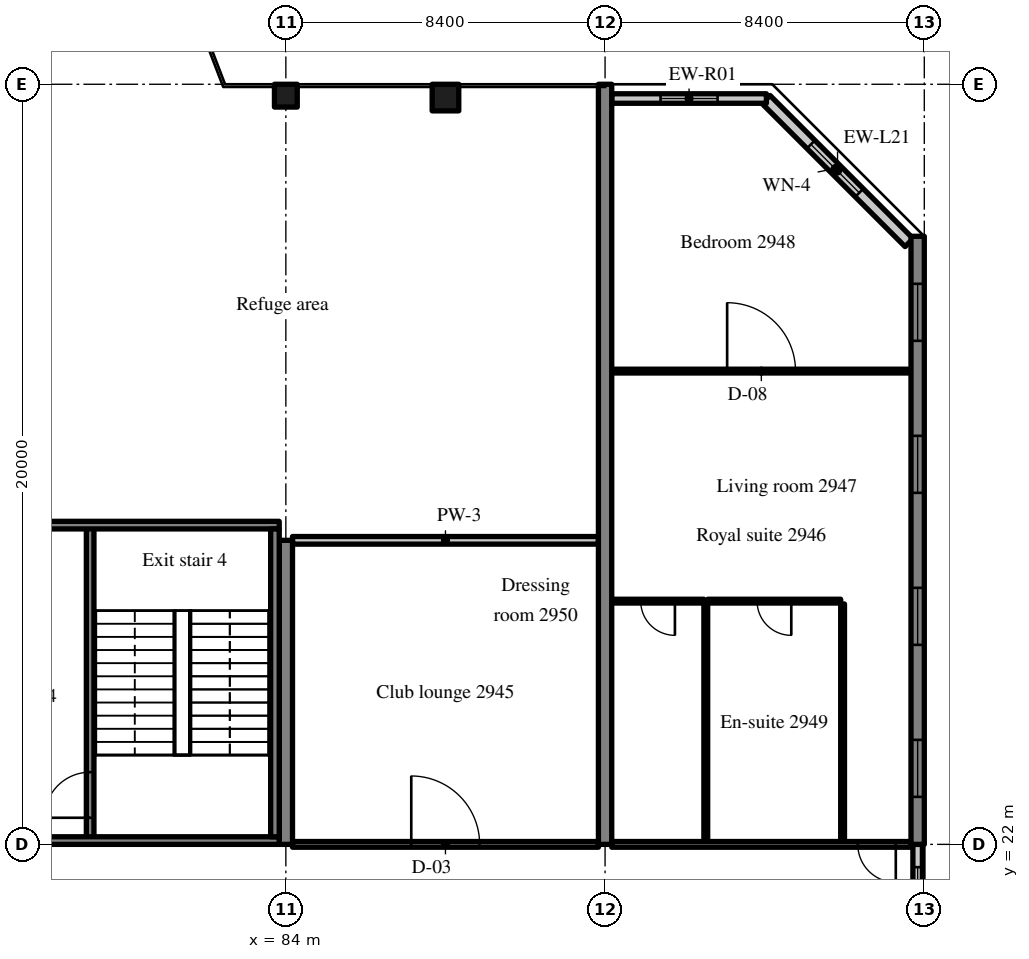
"""IFC4 building model, lengths in metres.
Left out: names, types, materials, properties, quantities, classifications, styles, units other than length and angle.
Written with IfcOpenShell. Run it as: python <this file> out.ifc"""

import sys

from ifc_helpers import new_model, si_unit, direction, frame, frame_2d, origin, origin_2d, place, context, subcontext, project, spatial, rectangle, extrude, source, transform, mapped, element, fill, save


model = new_model("IFC4")
c1 = context("Model", 3, precision=1e-05, world=origin(), true_north=direction((0.0, 1.0)))
c2 = subcontext(c1, "Body", "Model", "MODEL_VIEW")
j1 = project(units=[si_unit("LENGTHUNIT", "METRE"), si_unit("PLANEANGLEUNIT", "RADIAN")], contexts=[c1])
p1 = place(None, origin())
s1 = spatial("IfcSite", under=j1, at=p1, CompositionType="ELEMENT")
p2 = place(p1, origin())
s2 = spatial("IfcBuilding", under=s1, at=p2, CompositionType="ELEMENT")
p3 = place(p2, frame((0.0, 0.0, 121.8)))
s3 = spatial("IfcBuildingStorey", under=s2, at=p3, CompositionType="ELEMENT", Elevation=121.8)
m1 = source(origin(), c2, "Body", "SweptSolid", [
    extrude(rectangle(XDim=8.0, YDim=0.35, at=frame_2d((4.0, 0.0))), origin(), (0.0, 0.0, 1.0), 3.52),
])
p4 = place(p3, frame((84.0, 22.0, 0.0), z_axis=(0.0, 0.0, 1.0), x_axis=(0.0, 1.0, 0.0)))
e1 = element("IfcWall", 1, at=p4, inside=s3, PredefinedType="SHEAR", context=c2, shape_type="MappedRepresentation", body=[
    mapped(m1, transform((0.0, 0.0, 0.0), scale=1.0)),
])
m2 = source(origin(), c2, "Body", "SweptSolid", [
    extrude(rectangle(XDim=20.0, YDim=0.35, at=frame_2d((10.0, 0.0))), origin(), (0.0, 0.0, 1.0), 3.52),
])
p5 = place(p3, frame((92.4, 22.0, 0.0), z_axis=(0.0, 0.0, 1.0), x_axis=(0.0, 1.0, 0.0)))
e2 = element("IfcWall", 2, at=p5, inside=s3, PredefinedType="SHEAR", context=c2, shape_type="MappedRepresentation", body=[
    mapped(m2, transform((0.0, 0.0, 0.0), scale=1.0)),
])
m3 = source(origin(), c2, "Body", "SweptSolid", [
    extrude(rectangle(XDim=16.0, YDim=0.35, at=frame_2d((8.0, 0.0))), origin(), (0.0, 0.0, 1.0), 3.52),
])
p6 = place(p3, frame((100.625, 22.0, 0.0), z_axis=(0.0, 0.0, 1.0), x_axis=(0.0, 1.0, 0.0)))
e3 = element("IfcWall", 3, at=p6, inside=s3, PredefinedType="SHEAR", context=c2, shape_type="MappedRepresentation", body=[
    mapped(m3, transform((0.0, 0.0, 0.0), scale=1.0)),
])
m4 = source(origin(), c2, "Body", "SweptSolid", [
    extrude(rectangle(XDim=1.5, YDim=1.5, at=frame_2d((0.75, 0.75))), frame((0.0, 0.185, 0.0), z_axis=(0.0, -1.0, 0.0), x_axis=(1.0, 0.0, 0.0)), (0.0, 0.0, 1.0), 0.37),
])
p7 = place(p6, frame((1.25, 0.0, 0.9)))
e4 = element("IfcOpeningElement", 4, at=p7, cuts=e3, PredefinedType="OPENING", context=c2, shape_type="MappedRepresentation", body=[
    mapped(m4, transform((0.0, 0.0, 0.0), scale=1.0)),
])
p8 = place(p6, frame((5.25, 0.0, 0.9)))
e5 = element("IfcOpeningElement", 5, at=p8, cuts=e3, PredefinedType="OPENING", context=c2, shape_type="MappedRepresentation", body=[
    mapped(m4, transform((0.0, 0.0, 0.0), scale=1.0)),
])
p9 = place(p6, frame((9.25, 0.0, 0.9)))
e6 = element("IfcOpeningElement", 6, at=p9, cuts=e3, PredefinedType="OPENING", context=c2, shape_type="MappedRepresentation", body=[
    mapped(m4, transform((0.0, 0.0, 0.0), scale=1.0)),
])
p10 = place(p6, frame((13.25, 0.0, 0.9)))
e7 = element("IfcOpeningElement", 7, at=p10, cuts=e3, PredefinedType="OPENING", context=c2, shape_type="MappedRepresentation", body=[
    mapped(m4, transform((0.0, 0.0, 0.0), scale=1.0)),
])
m5 = source(origin(), c2, "Body", "SweptSolid", [
    extrude(rectangle(XDim=0.6, YDim=0.6, at=origin_2d()), origin(), (0.0, 0.0, 1.0), 3.52),
])
p11 = place(p3, frame((84.0, 41.7, 0.0), z_axis=(0.0, 0.0, 1.0), x_axis=(1.0, 0.0, 0.0)))
e8 = element("IfcColumn", 8, at=p11, inside=s3, PredefinedType="COLUMN", context=c2, shape_type="MappedRepresentation", body=[
    mapped(m5, transform((0.0, 0.0, 0.0), scale=1.0)),
])
m6 = source(origin(), c2, "Body", "SweptSolid", [
    extrude(rectangle(XDim=0.7, YDim=0.7, at=origin_2d()), origin(), (0.0, 0.0, 1.0), 3.52),
])
p12 = place(p3, frame((88.2, 41.65, 0.0), z_axis=(0.0, 0.0, 1.0), x_axis=(1.0, 0.0, 0.0)))
e9 = element("IfcColumn", 9, at=p12, inside=s3, PredefinedType="COLUMN", context=c2, shape_type="MappedRepresentation", body=[
    mapped(m6, transform((0.0, 0.0, 0.0), scale=1.0)),
])
m7 = source(origin(), c2, "Body", "SweptSolid", [
    extrude(rectangle(XDim=5.326, YDim=0.3, at=frame_2d((2.663, 0.0))), origin(), (0.0, 0.0, 1.0), 3.52),
])
p13 = place(p3, frame((100.4, 37.834, 0.0), z_axis=(0.0, 0.0, 1.0), x_axis=(-0.707083859269, 0.707129702361, 0.0)))
e10 = element("IfcWall", 10, at=p13, inside=s3, PredefinedType="SOLIDWALL", context=c2, shape_type="MappedRepresentation", body=[
    mapped(m7, transform((0.0, 0.0, 0.0), scale=1.0)),
])
m8 = source(origin(), c2, "Body", "SweptSolid", [
    extrude(rectangle(XDim=1.8, YDim=1.5, at=frame_2d((0.9, 0.75))), frame((0.0, 0.16, 0.0), z_axis=(0.0, -1.0, 0.0), x_axis=(1.0, 0.0, 0.0)), (0.0, 0.0, 1.0), 0.32),
])
p14 = place(p13, frame((1.854, 0.0, 0.9)))
e11 = element("IfcOpeningElement", 11, at=p14, cuts=e10, PredefinedType="OPENING", context=c2, shape_type="MappedRepresentation", body=[
    mapped(m8, transform((0.0, 0.0, 0.0), scale=1.0)),
])
m9 = source(origin(), c2, "Body", "SweptSolid", [
    extrude(rectangle(XDim=4.07, YDim=0.25, at=frame_2d((2.035, 0.0))), origin(), (0.0, 0.0, 1.0), 2.82),
])
p15 = place(p3, frame((96.645, 41.625, 0.0), z_axis=(0.0, 0.0, 1.0), x_axis=(-1.0, 0.0, 0.0)))
e12 = element("IfcWall", 12, at=p15, inside=s3, PredefinedType="SOLIDWALL", context=c2, shape_type="MappedRepresentation", body=[
    mapped(m9, transform((0.0, 0.0, 0.0), scale=1.0)),
])
m10 = source(origin(), c2, "Body", "SweptSolid", [
    extrude(rectangle(XDim=1.5, YDim=1.5, at=frame_2d((0.75, 0.75))), frame((0.0, 0.135, 0.0), z_axis=(0.0, -1.0, 0.0), x_axis=(1.0, 0.0, 0.0)), (0.0, 0.0, 1.0), 0.27),
])
p16 = place(p15, frame((1.285, 0.0, 0.9)))
e13 = element("IfcOpeningElement", 13, at=p16, cuts=e12, PredefinedType="OPENING", context=c2, shape_type="MappedRepresentation", body=[
    mapped(m10, transform((0.0, 0.0, 0.0), scale=1.0)),
])
m11 = source(origin(), c2, "Body", "SweptSolid", [
    extrude(rectangle(XDim=2.4, YDim=0.25, at=frame_2d((1.2, 0.0))), origin(), (0.0, 0.0, 1.0), 2.62),
])
p17 = place(p3, frame((100.625, 19.6, 0.0), z_axis=(0.0, 0.0, 1.0), x_axis=(0.0, 1.0, 0.0)))
e14 = element("IfcWall", 14, at=p17, inside=s3, PredefinedType="SOLIDWALL", context=c2, shape_type="MappedRepresentation", body=[
    mapped(m11, transform((0.0, 0.0, 0.0), scale=1.0)),
])
m12 = source(origin(), c2, "Body", "SweptSolid", [
    extrude(rectangle(XDim=1.2, YDim=1.5, at=frame_2d((0.6, 0.75))), frame((0.0, 0.135, 0.0), z_axis=(0.0, -1.0, 0.0), x_axis=(1.0, 0.0, 0.0)), (0.0, 0.0, 1.0), 0.27),
])
p18 = place(p17, frame((0.6, 0.0, 0.9)))
e15 = element("IfcOpeningElement", 15, at=p18, cuts=e14, PredefinedType="OPENING", context=c2, shape_type="MappedRepresentation", body=[
    mapped(m12, transform((0.0, 0.0, 0.0), scale=1.0)),
])
m13 = source(origin(), c2, "Body", "SweptSolid", [
    extrude(rectangle(XDim=8.3, YDim=0.2, at=frame_2d((4.15, 0.0))), origin(), (0.0, 0.0, 1.0), 3.52),
])
p19 = place(p3, frame((78.85, 22.1, 0.0), z_axis=(0.0, 0.0, 1.0), x_axis=(0.0, 1.0, 0.0)))
e16 = element("IfcWall", 16, at=p19, inside=s3, PredefinedType="SOLIDWALL", context=c2, shape_type="MappedRepresentation", body=[
    mapped(m13, transform((0.0, 0.0, 0.0), scale=1.0)),
])
m14 = source(origin(), c2, "Body", "SweptSolid", [
    extrude(rectangle(XDim=1.2, YDim=2.1, at=frame_2d((0.6, 1.05))), frame((0.0, 0.11, 0.0), z_axis=(0.0, -1.0, 0.0), x_axis=(1.0, 0.0, 0.0)), (0.0, 0.0, 1.0), 0.22),
])
p20 = place(p19, frame((0.6, 0.0, 0.0)))
e17 = element("IfcOpeningElement", 17, at=p20, cuts=e16, PredefinedType="OPENING", context=c2, shape_type="MappedRepresentation", body=[
    mapped(m14, transform((0.0, 0.0, 0.0), scale=1.0)),
])
m15 = source(origin(), c2, "Body", "SweptSolid", [
    extrude(rectangle(XDim=8.225, YDim=0.2, at=frame_2d((4.112, 0.0))), origin(), (0.0, 0.0, 1.0), 3.52),
])
p21 = place(p3, frame((83.825, 22.1, 0.0), z_axis=(0.0, 0.0, 1.0), x_axis=(-1.0, 0.0, 0.0)))
e18 = element("IfcWall", 18, at=p21, inside=s3, PredefinedType="SOLIDWALL", context=c2, shape_type="MappedRepresentation", body=[
    mapped(m15, transform((0.0, 0.0, 0.0), scale=1.0)),
])
p22 = place(p21, frame((6.025, 0.0, 0.0)))
e19 = element("IfcOpeningElement", 19, at=p22, cuts=e18, PredefinedType="OPENING", context=c2, shape_type="MappedRepresentation", body=[
    mapped(m14, transform((0.0, 0.0, 0.0), scale=1.0)),
])
p23 = place(p3, frame((83.825, 30.4, 0.0), z_axis=(0.0, 0.0, 1.0), x_axis=(-1.0, 0.0, 0.0)))
e20 = element("IfcWall", 20, at=p23, inside=s3, PredefinedType="SOLIDWALL", context=c2, shape_type="MappedRepresentation", body=[
    mapped(m15, transform((0.0, 0.0, 0.0), scale=1.0)),
])
m16 = source(origin(), c2, "Body", "SweptSolid", [
    extrude(rectangle(XDim=1.0, YDim=2.1, at=frame_2d((0.5, 1.05))), frame((0.0, 0.11, 0.0), z_axis=(0.0, -1.0, 0.0), x_axis=(1.0, 0.0, 0.0)), (0.0, 0.0, 1.0), 0.22),
])
p24 = place(p23, frame((6.125, 0.0, 0.0)))
e21 = element("IfcOpeningElement", 21, at=p24, cuts=e20, PredefinedType="OPENING", context=c2, shape_type="MappedRepresentation", body=[
    mapped(m16, transform((0.0, 0.0, 0.0), scale=1.0)),
])
m17 = source(origin(), c2, "Body", "SweptSolid", [
    extrude(rectangle(XDim=8.1, YDim=0.225, at=frame_2d((4.05, 0.0))), origin(), (0.0, 0.0, 1.0), 3.52),
])
p25 = place(p3, frame((83.713, 22.2, 0.0), z_axis=(0.0, 0.0, 1.0), x_axis=(0.0, 1.0, 0.0)))
e22 = element("IfcWall", 22, at=p25, inside=s3, PredefinedType="SOLIDWALL", context=c2, shape_type="MappedRepresentation", body=[
    mapped(m17, transform((0.0, 0.0, 0.0), scale=1.0)),
])
m18 = source(origin(), c2, "Body", "SweptSolid", [
    extrude(rectangle(XDim=8.05, YDim=0.15, at=frame_2d((4.025, 0.0))), origin(), (0.0, 0.0, 1.0), 2.82),
])
p26 = place(p3, frame((84.175, 22.0, 0.0), z_axis=(0.0, 0.0, 1.0), x_axis=(1.0, 0.0, 0.0)))
e23 = element("IfcWall", 23, at=p26, inside=s3, PredefinedType="PARTITIONING", context=c2, shape_type="MappedRepresentation", body=[
    mapped(m18, transform((0.0, 0.0, 0.0), scale=1.0)),
])
m19 = source(origin(), c2, "Body", "SweptSolid", [
    extrude(rectangle(XDim=1.8, YDim=2.1, at=frame_2d((0.9, 1.05))), frame((0.0, 0.085, 0.0), z_axis=(0.0, -1.0, 0.0), x_axis=(1.0, 0.0, 0.0)), (0.0, 0.0, 1.0), 0.17),
])
p27 = place(p26, frame((3.125, 0.0, 0.0)))
e24 = element("IfcOpeningElement", 24, at=p27, cuts=e23, PredefinedType="OPENING", context=c2, shape_type="MappedRepresentation", body=[
    mapped(m19, transform((0.0, 0.0, 0.0), scale=1.0)),
])
m20 = source(origin(), c2, "Body", "SweptSolid", [
    extrude(rectangle(XDim=8.05, YDim=0.2, at=frame_2d((4.025, 0.0))), origin(), (0.0, 0.0, 1.0), 3.52),
])
p28 = place(p3, frame((84.175, 30.0, 0.0), z_axis=(0.0, 0.0, 1.0), x_axis=(1.0, 0.0, 0.0)))
e25 = element("IfcWall", 25, at=p28, inside=s3, PredefinedType="PARTITIONING", context=c2, shape_type="MappedRepresentation", body=[
    mapped(m20, transform((0.0, 0.0, 0.0), scale=1.0)),
])
m21 = source(origin(), c2, "Body", "SweptSolid", [
    extrude(rectangle(XDim=6.25, YDim=0.1, at=frame_2d((3.125, 0.0))), origin(), (0.0, 0.0, 1.0), 3.52),
])
for number, where, z_axis, x_axis in (
    (26, (98.65, 22.075, 0.0), (0.0, 0.0, 1.0), (0.0, 1.0, 0.0)),
    (27, (95.05, 22.075, 0.0), (0.0, 0.0, 1.0), (0.0, 1.0, 0.0)),
):
    element("IfcWall", number, at=place(p3, frame(where, z_axis=z_axis, x_axis=x_axis)), inside=s3, PredefinedType="PARTITIONING", context=c2, shape_type="MappedRepresentation", body=[
        mapped(m21, transform((0.0, 0.0, 0.0), scale=1.0)),
    ])
m22 = source(origin(), c2, "Body", "SweptSolid", [
    extrude(rectangle(XDim=3.5, YDim=0.1, at=frame_2d((1.75, 0.0))), origin(), (0.0, 0.0, 1.0), 3.52),
])
p29 = place(p3, frame((95.1, 28.4, 0.0), z_axis=(0.0, 0.0, 1.0), x_axis=(1.0, 0.0, 0.0)))
e28 = element("IfcWall", 28, at=p29, inside=s3, PredefinedType="PARTITIONING", context=c2, shape_type="MappedRepresentation", body=[
    mapped(m22, transform((0.0, 0.0, 0.0), scale=1.0)),
])
m23 = source(origin(), c2, "Body", "SweptSolid", [
    extrude(rectangle(XDim=0.9, YDim=2.1, at=frame_2d((0.45, 1.05))), frame((0.0, 0.06, 0.0), z_axis=(0.0, -1.0, 0.0), x_axis=(1.0, 0.0, 0.0)), (0.0, 0.0, 1.0), 0.12),
])
p30 = place(p29, frame((1.3, 0.0, 0.0)))
e29 = element("IfcOpeningElement", 29, at=p30, cuts=e28, PredefinedType="OPENING", context=c2, shape_type="MappedRepresentation", body=[
    mapped(m23, transform((0.0, 0.0, 0.0), scale=1.0)),
])
m24 = source(origin(), c2, "Body", "SweptSolid", [
    extrude(rectangle(XDim=2.425, YDim=0.1, at=frame_2d((1.212, 0.0))), origin(), (0.0, 0.0, 1.0), 3.52),
])
p31 = place(p3, frame((92.575, 28.4, 0.0), z_axis=(0.0, 0.0, 1.0), x_axis=(1.0, 0.0, 0.0)))
e30 = element("IfcWall", 30, at=p31, inside=s3, PredefinedType="PARTITIONING", context=c2, shape_type="MappedRepresentation", body=[
    mapped(m24, transform((0.0, 0.0, 0.0), scale=1.0)),
])
p32 = place(p31, frame((0.763, 0.0, 0.0)))
e31 = element("IfcOpeningElement", 31, at=p32, cuts=e30, PredefinedType="OPENING", context=c2, shape_type="MappedRepresentation", body=[
    mapped(m23, transform((0.0, 0.0, 0.0), scale=1.0)),
])
m25 = source(origin(), c2, "Body", "SweptSolid", [
    extrude(rectangle(XDim=7.875, YDim=0.1, at=frame_2d((3.938, 0.0))), origin(), (0.0, 0.0, 1.0), 3.52),
])
p33 = place(p3, frame((92.575, 34.453, 0.0), z_axis=(0.0, 0.0, 1.0), x_axis=(1.0, 0.0, 0.0)))
e32 = element("IfcWall", 32, at=p33, inside=s3, PredefinedType="PARTITIONING", context=c2, shape_type="MappedRepresentation", body=[
    mapped(m25, transform((0.0, 0.0, 0.0), scale=1.0)),
])
m26 = source(origin(), c2, "Body", "SweptSolid", [
    extrude(rectangle(XDim=1.8, YDim=2.1, at=frame_2d((0.9, 1.05))), frame((0.0, 0.06, 0.0), z_axis=(0.0, -1.0, 0.0), x_axis=(1.0, 0.0, 0.0)), (0.0, 0.0, 1.0), 0.12),
])
p34 = place(p33, frame((3.037, 0.0, 0.0)))
e33 = element("IfcOpeningElement", 33, at=p34, cuts=e32, PredefinedType="OPENING", context=c2, shape_type="MappedRepresentation", body=[
    mapped(m26, transform((0.0, 0.0, 0.0), scale=1.0)),
])
m27 = source(origin(), c2, "Body", "SweptSolid", [
    extrude(rectangle(XDim=7.875, YDim=0.15, at=frame_2d((3.938, 0.0))), origin(), (0.0, 0.0, 1.0), 2.82),
])
p35 = place(p3, frame((92.575, 22.0, 0.0), z_axis=(0.0, 0.0, 1.0), x_axis=(1.0, 0.0, 0.0)))
e34 = element("IfcWall", 34, at=p35, inside=s3, PredefinedType="PARTITIONING", context=c2, shape_type="MappedRepresentation", body=[
    mapped(m27, transform((0.0, 0.0, 0.0), scale=1.0)),
])
m28 = source(origin(), c2, "Body", "SweptSolid", [
    extrude(rectangle(XDim=1.0, YDim=2.1, at=frame_2d((0.5, 1.05))), frame((0.0, 0.085, 0.0), z_axis=(0.0, -1.0, 0.0), x_axis=(1.0, 0.0, 0.0)), (0.0, 0.0, 1.0), 0.17),
])
p36 = place(p35, frame((6.475, 0.0, 0.0)))
e35 = element("IfcOpeningElement", 35, at=p36, cuts=e34, PredefinedType="OPENING", context=c2, shape_type="MappedRepresentation", body=[
    mapped(m28, transform((0.0, 0.0, 0.0), scale=1.0)),
])
m29 = source(origin(), c2, "Body", "SweptSolid", [
    extrude(rectangle(XDim=1.8, YDim=1.5, at=frame_2d((0.9, 0.75))), frame((0.0, 0.03, 0.0), z_axis=(0.0, -1.0, 0.0), x_axis=(1.0, 0.0, 0.0)), (0.0, 0.0, 1.0), 0.06),
])
p37 = place(p14, origin())
e36 = element("IfcWindow", 36, at=p37, inside=s3, PartitioningType="SINGLE_PANEL", PredefinedType="WINDOW", context=c2, shape_type="MappedRepresentation", body=[
    mapped(m29, transform((0.0, 0.0, 0.0), scale=1.0)),
])
fill(e11, e36)
m30 = source(origin(), c2, "Body", "SweptSolid", [
    extrude(rectangle(XDim=1.5, YDim=1.5, at=frame_2d((0.75, 0.75))), frame((0.0, 0.03, 0.0), z_axis=(0.0, -1.0, 0.0), x_axis=(1.0, 0.0, 0.0)), (0.0, 0.0, 1.0), 0.06),
])
p38 = place(p16, origin())
e37 = element("IfcWindow", 37, at=p38, inside=s3, PartitioningType="SINGLE_PANEL", PredefinedType="WINDOW", context=c2, shape_type="MappedRepresentation", body=[
    mapped(m30, transform((0.0, 0.0, 0.0), scale=1.0)),
])
fill(e13, e37)
p39 = place(p7, origin())
e38 = element("IfcWindow", 38, at=p39, inside=s3, PartitioningType="SINGLE_PANEL", PredefinedType="WINDOW", context=c2, shape_type="MappedRepresentation", body=[
    mapped(m30, transform((0.0, 0.0, 0.0), scale=1.0)),
])
fill(e4, e38)
p40 = place(p8, origin())
e39 = element("IfcWindow", 39, at=p40, inside=s3, PartitioningType="SINGLE_PANEL", PredefinedType="WINDOW", context=c2, shape_type="MappedRepresentation", body=[
    mapped(m30, transform((0.0, 0.0, 0.0), scale=1.0)),
])
fill(e5, e39)
p41 = place(p9, origin())
e40 = element("IfcWindow", 40, at=p41, inside=s3, PartitioningType="SINGLE_PANEL", PredefinedType="WINDOW", context=c2, shape_type="MappedRepresentation", body=[
    mapped(m30, transform((0.0, 0.0, 0.0), scale=1.0)),
])
fill(e6, e40)
p42 = place(p10, origin())
e41 = element("IfcWindow", 41, at=p42, inside=s3, PartitioningType="SINGLE_PANEL", PredefinedType="WINDOW", context=c2, shape_type="MappedRepresentation", body=[
    mapped(m30, transform((0.0, 0.0, 0.0), scale=1.0)),
])
fill(e7, e41)
m31 = source(origin(), c2, "Body", "SweptSolid", [
    extrude(rectangle(XDim=1.2, YDim=1.5, at=frame_2d((0.6, 0.75))), frame((0.0, 0.03, 0.0), z_axis=(0.0, -1.0, 0.0), x_axis=(1.0, 0.0, 0.0)), (0.0, 0.0, 1.0), 0.06),
])
p43 = place(p18, origin())
e42 = element("IfcWindow", 42, at=p43, inside=s3, PartitioningType="SINGLE_PANEL", PredefinedType="WINDOW", context=c2, shape_type="MappedRepresentation", body=[
    mapped(m31, transform((0.0, 0.0, 0.0), scale=1.0)),
])
fill(e15, e42)
m32 = source(origin(), c2, "Body", "SweptSolid", [
    extrude(rectangle(XDim=1.2, YDim=2.1, at=frame_2d((0.6, 1.05))), frame((0.0, 0.025, 0.0), z_axis=(0.0, -1.0, 0.0), x_axis=(1.0, 0.0, 0.0)), (0.0, 0.0, 1.0), 0.05),
])
p44 = place(p20, origin())
e43 = element("IfcDoor", 43, at=p44, inside=s3, OperationType="SINGLE_SWING_LEFT", PredefinedType="DOOR", context=c2, shape_type="MappedRepresentation", body=[
    mapped(m32, transform((0.0, 0.0, 0.0), scale=1.0)),
])
fill(e17, e43)
m33 = source(origin(), c2, "Body", "SweptSolid", [
    extrude(rectangle(XDim=1.8, YDim=2.1, at=frame_2d((0.9, 1.05))), frame((0.0, 0.025, 0.0), z_axis=(0.0, -1.0, 0.0), x_axis=(1.0, 0.0, 0.0)), (0.0, 0.0, 1.0), 0.05),
])
p45 = place(p27, origin())
e44 = element("IfcDoor", 44, at=p45, inside=s3, OperationType="DOUBLE_DOOR_SINGLE_SWING", PredefinedType="DOOR", context=c2, shape_type="MappedRepresentation", body=[
    mapped(m33, transform((0.0, 0.0, 0.0), scale=1.0)),
])
fill(e24, e44)
m34 = source(origin(), c2, "Body", "SweptSolid", [
    extrude(rectangle(XDim=0.9, YDim=2.1, at=frame_2d((0.45, 1.05))), frame((0.0, 0.025, 0.0), z_axis=(0.0, -1.0, 0.0), x_axis=(1.0, 0.0, 0.0)), (0.0, 0.0, 1.0), 0.05),
])
p46 = place(p30, origin())
e45 = element("IfcDoor", 45, at=p46, inside=s3, OperationType="SINGLE_SWING_RIGHT", PredefinedType="DOOR", context=c2, shape_type="MappedRepresentation", body=[
    mapped(m34, transform((0.0, 0.0, 0.0), scale=1.0)),
])
fill(e29, e45)
p47 = place(p32, origin())
e46 = element("IfcDoor", 46, at=p47, inside=s3, OperationType="SINGLE_SWING_RIGHT", PredefinedType="DOOR", context=c2, shape_type="MappedRepresentation", body=[
    mapped(m34, transform((0.0, 0.0, 0.0), scale=1.0)),
])
fill(e31, e46)
p48 = place(p34, origin())
e47 = element("IfcDoor", 47, at=p48, inside=s3, OperationType="DOUBLE_DOOR_SINGLE_SWING", PredefinedType="DOOR", context=c2, shape_type="MappedRepresentation", body=[
    mapped(m33, transform((0.0, 0.0, 0.0), scale=1.0)),
])
fill(e33, e47)
m35 = source(origin(), c2, "Body", "SweptSolid", [
    extrude(rectangle(XDim=1.0, YDim=2.1, at=frame_2d((0.5, 1.05))), frame((0.0, 0.025, 0.0), z_axis=(0.0, -1.0, 0.0), x_axis=(1.0, 0.0, 0.0)), (0.0, 0.0, 1.0), 0.05),
])
p49 = place(p36, origin())
e48 = element("IfcDoor", 48, at=p49, inside=s3, OperationType="SINGLE_SWING_RIGHT", PredefinedType="DOOR", context=c2, shape_type="MappedRepresentation", body=[
    mapped(m35, transform((0.0, 0.0, 0.0), scale=1.0)),
])
fill(e35, e48)
save(model, sys.argv[1])
